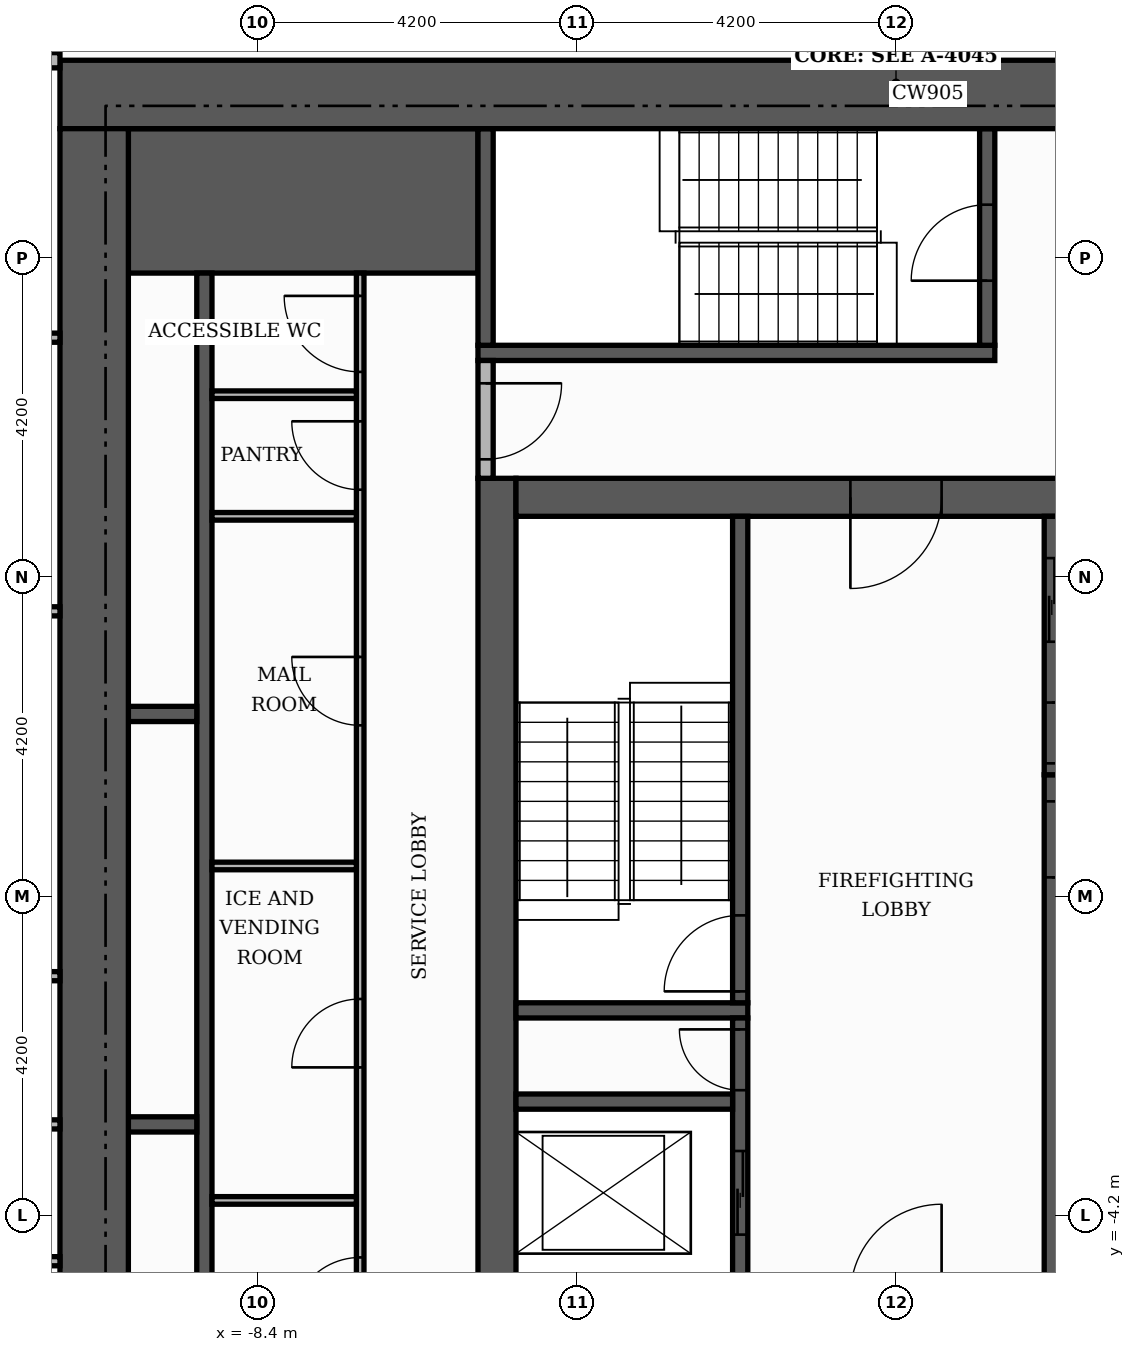
"""IFC4 building model, lengths in metres.
Left out: names, types, materials, properties, quantities, classifications, styles, units other than length and angle.
Written with IfcOpenShell. Run it as: python <this file> out.ifc"""

import sys

from ifc_helpers import new_model, si_unit, direction, frame, frame_2d, origin, place, context, subcontext, project, spatial, rectangle, extrude, element, fill, save


model = new_model("IFC4")
c1 = context("Model", 3, precision=1e-05, world=origin(), true_north=direction((0.0, 1.0)))
c2 = subcontext(c1, "Body", "Model", "MODEL_VIEW")
j1 = project(units=[si_unit("LENGTHUNIT", "METRE"), si_unit("PLANEANGLEUNIT", "RADIAN")], contexts=[c1])
p1 = place(None, origin())
s1 = spatial("IfcSite", under=j1, at=p1, CompositionType="ELEMENT")
p2 = place(p1, origin())
s2 = spatial("IfcBuilding", under=s1, at=p2, CompositionType="ELEMENT")
p3 = place(p2, frame((0.0, 0.0, 283.5)))
s3 = spatial("IfcBuildingStorey", under=s2, at=p3, CompositionType="ELEMENT", Elevation=283.5)
p4 = place(p3, frame((-5.25, -5.0, 0.0), z_axis=(0.0, 0.0, 1.0), x_axis=(0.0, 1.0, 0.0)))
e1 = element("IfcWall", 1, at=p4, inside=s3, PredefinedType="SHEAR", context=c2, shape_type="SweptSolid", body=[
    extrude(rectangle(XDim=10.5, YDim=0.5, at=frame_2d((5.25, 0.0))), origin(), (0.0, 0.0, 1.0), 3.4),
])
p5 = place(p3, frame((-5.0, 5.25, 0.0), z_axis=(0.0, 0.0, 1.0), x_axis=(1.0, 0.0, 0.0)))
e2 = element("IfcWall", 2, at=p5, inside=s3, PredefinedType="SHEAR", context=c2, shape_type="SweptSolid", body=[
    extrude(rectangle(XDim=10.0, YDim=0.5, at=frame_2d((5.0, 0.0))), origin(), (0.0, 0.0, 1.0), 3.4),
])
p6 = place(p5, frame((4.4, 0.0, 0.0)))
e3 = element("IfcOpeningElement", 3, at=p6, cuts=e2, PredefinedType="OPENING", context=c2, shape_type="SweptSolid", body=[
    extrude(rectangle(XDim=1.2, YDim=2.1, at=frame_2d((0.6, 1.05))), frame((0.0, 0.26, 0.0), z_axis=(0.0, -1.0, 0.0), x_axis=(1.0, 0.0, 0.0)), (0.0, 0.0, 1.0), 0.52),
])
p7 = place(p3, frame((-10.1, 9.15, 0.0), z_axis=(0.0, 0.0, 1.0), x_axis=(1.0, 0.0, 0.0)))
e4 = element("IfcWall", 4, at=p7, inside=s3, PredefinedType="SHEAR", context=c2, shape_type="SweptSolid", body=[
    extrude(rectangle(XDim=4.6, YDim=1.9, at=frame_2d((2.3, 0.0))), origin(), (0.0, 0.0, 1.0), 3.4),
])
p8 = place(p3, frame((2.05, -5.0, 0.0), z_axis=(0.0, 0.0, 1.0), x_axis=(0.0, 1.0, 0.0)))
e5 = element("IfcWall", 5, at=p8, inside=s3, PredefinedType="SHEAR", context=c2, shape_type="SweptSolid", body=[
    extrude(rectangle(XDim=6.6, YDim=0.2, at=frame_2d((3.3, 0.0))), origin(), (0.0, 0.0, 1.0), 3.4),
])
p9 = place(p8, frame((5.25, 0.0, 0.0)))
e6 = element("IfcOpeningElement", 6, at=p9, cuts=e5, PredefinedType="OPENING", context=c2, shape_type="SweptSolid", body=[
    extrude(rectangle(XDim=1.0, YDim=2.1, at=frame_2d((0.5, 1.05))), frame((0.0, 0.11, 0.0), z_axis=(0.0, -1.0, 0.0), x_axis=(1.0, 0.0, 0.0)), (0.0, 0.0, 1.0), 0.22),
])
p10 = place(p3, frame((-5.0, -1.5, 0.0), z_axis=(0.0, 0.0, 1.0), x_axis=(1.0, 0.0, 0.0)))
e7 = element("IfcWall", 7, at=p10, inside=s3, PredefinedType="SHEAR", context=c2, shape_type="SweptSolid", body=[
    extrude(rectangle(XDim=3.05, YDim=0.2, at=frame_2d((1.525, 0.0))), origin(), (0.0, 0.0, 1.0), 3.4),
])
p11 = place(p3, frame((-2.05, -1.4, 0.0), z_axis=(0.0, 0.0, 1.0), x_axis=(0.0, 1.0, 0.0)))
e8 = element("IfcWall", 8, at=p11, inside=s3, PredefinedType="SHEAR", context=c2, shape_type="SweptSolid", body=[
    extrude(rectangle(XDim=6.4, YDim=0.2, at=frame_2d((3.2, 0.0))), origin(), (0.0, 0.0, 1.0), 3.4),
])
p12 = place(p11, frame((0.15, 0.0, 0.0)))
e9 = element("IfcOpeningElement", 9, at=p12, cuts=e8, PredefinedType="OPENING", context=c2, shape_type="SweptSolid", body=[
    extrude(rectangle(XDim=1.0, YDim=2.1, at=frame_2d((0.5, 1.05))), frame((0.0, 0.11, 0.0), z_axis=(0.0, -1.0, 0.0), x_axis=(1.0, 0.0, 0.0)), (0.0, 0.0, 1.0), 0.22),
])
p13 = place(p3, frame((-5.5, 7.15, 0.0), z_axis=(0.0, 0.0, 1.0), x_axis=(1.0, 0.0, 0.0)))
e10 = element("IfcWall", 10, at=p13, inside=s3, PredefinedType="SHEAR", context=c2, shape_type="SweptSolid", body=[
    extrude(rectangle(XDim=6.8, YDim=0.2, at=frame_2d((3.4, 0.0))), origin(), (0.0, 0.0, 1.0), 3.4),
])
p14 = place(p3, frame((-5.4, 7.25, 0.0), z_axis=(0.0, 0.0, 1.0), x_axis=(0.0, 1.0, 0.0)))
e11 = element("IfcWall", 11, at=p14, inside=s3, PredefinedType="SHEAR", context=c2, shape_type="SweptSolid", body=[
    extrude(rectangle(XDim=2.85, YDim=0.2, at=frame_2d((1.425, 0.0))), origin(), (0.0, 0.0, 1.0), 3.4),
])
p15 = place(p3, frame((1.2, 7.25, 0.0), z_axis=(0.0, 0.0, 1.0), x_axis=(0.0, 1.0, 0.0)))
e12 = element("IfcWall", 12, at=p15, inside=s3, PredefinedType="SHEAR", context=c2, shape_type="SweptSolid", body=[
    extrude(rectangle(XDim=2.85, YDim=0.2, at=frame_2d((1.425, 0.0))), origin(), (0.0, 0.0, 1.0), 3.4),
])
p16 = place(p15, frame((0.85, 0.0, 0.0)))
e13 = element("IfcOpeningElement", 13, at=p16, cuts=e12, PredefinedType="OPENING", context=c2, shape_type="SweptSolid", body=[
    extrude(rectangle(XDim=1.0, YDim=2.1, at=frame_2d((0.5, 1.05))), frame((0.0, 0.11, 0.0), z_axis=(0.0, -1.0, 0.0), x_axis=(1.0, 0.0, 0.0)), (0.0, 0.0, 1.0), 0.22),
])
p17 = place(p3, frame((-9.1, -8.2, 0.0), z_axis=(0.0, 0.0, 1.0), x_axis=(0.0, 1.0, 0.0)))
e14 = element("IfcWall", 14, at=p17, inside=s3, PredefinedType="SHEAR", context=c2, shape_type="SweptSolid", body=[
    extrude(rectangle(XDim=16.4, YDim=0.2, at=frame_2d((8.2, 0.0))), origin(), (0.0, 0.0, 1.0), 3.4),
])
p18 = place(p3, frame((-2.05, -5.0, 0.0), z_axis=(0.0, 0.0, 1.0), x_axis=(0.0, 1.0, 0.0)))
e15 = element("IfcWall", 15, at=p18, inside=s3, PredefinedType="SHEAR", context=c2, shape_type="SweptSolid", body=[
    extrude(rectangle(XDim=3.4, YDim=0.2, at=frame_2d((1.7, 0.0))), origin(), (0.0, 0.0, 1.0), 3.4),
])
p19 = place(p18, frame((0.55, 0.0, 0.0)))
e16 = element("IfcOpeningElement", 16, at=p19, cuts=e15, PredefinedType="OPENING", context=c2, shape_type="SweptSolid", body=[
    extrude(rectangle(XDim=1.1, YDim=2.1, at=frame_2d((0.55, 1.05))), frame((0.0, 0.11, 0.0), z_axis=(0.0, -1.0, 0.0), x_axis=(1.0, 0.0, 0.0)), (0.0, 0.0, 1.0), 0.22),
])
p20 = place(p18, frame((2.45, 0.0, 0.0)))
e17 = element("IfcOpeningElement", 17, at=p20, cuts=e15, PredefinedType="OPENING", context=c2, shape_type="SweptSolid", body=[
    extrude(rectangle(XDim=0.8, YDim=2.1, at=frame_2d((0.4, 1.05))), frame((0.0, 0.11, 0.0), z_axis=(0.0, -1.0, 0.0), x_axis=(1.0, 0.0, 0.0)), (0.0, 0.0, 1.0), 0.22),
])
p21 = place(p3, frame((-10.1, -3.0, 0.0), z_axis=(0.0, 0.0, 1.0), x_axis=(1.0, 0.0, 0.0)))
e18 = element("IfcWall", 18, at=p21, inside=s3, PredefinedType="SHEAR", context=c2, shape_type="SweptSolid", body=[
    extrude(rectangle(XDim=0.9, YDim=0.2, at=frame_2d((0.45, 0.0))), origin(), (0.0, 0.0, 1.0), 3.4),
])
p22 = place(p3, frame((-5.0, -2.7, 0.0), z_axis=(0.0, 0.0, 1.0), x_axis=(1.0, 0.0, 0.0)))
e19 = element("IfcWall", 19, at=p22, inside=s3, PredefinedType="SHEAR", context=c2, shape_type="SweptSolid", body=[
    extrude(rectangle(XDim=2.85, YDim=0.2, at=frame_2d((1.425, 0.0))), origin(), (0.0, 0.0, 1.0), 3.4),
])
p23 = place(p3, frame((2.05, 1.6, 0.0), z_axis=(0.0, 0.0, 1.0), x_axis=(0.0, 1.0, 0.0)))
e20 = element("IfcWall", 20, at=p23, inside=s3, PredefinedType="SHEAR", context=c2, shape_type="SweptSolid", body=[
    extrude(rectangle(XDim=3.4, YDim=0.2, at=frame_2d((1.7, 0.0))), origin(), (0.0, 0.0, 1.0), 3.4),
])
p24 = place(p23, frame((1.75, 0.0, 0.0)))
e21 = element("IfcOpeningElement", 21, at=p24, cuts=e20, PredefinedType="OPENING", context=c2, shape_type="SweptSolid", body=[
    extrude(rectangle(XDim=1.1, YDim=2.1, at=frame_2d((0.55, 1.05))), frame((0.0, 0.11, 0.0), z_axis=(0.0, -1.0, 0.0), x_axis=(1.0, 0.0, 0.0)), (0.0, 0.0, 1.0), 0.22),
])
p25 = place(p23, frame((0.15, 0.0, 0.0)))
e22 = element("IfcOpeningElement", 22, at=p25, cuts=e20, PredefinedType="OPENING", context=c2, shape_type="SweptSolid", body=[
    extrude(rectangle(XDim=0.8, YDim=2.1, at=frame_2d((0.4, 1.05))), frame((0.0, 0.11, 0.0), z_axis=(0.0, -1.0, 0.0), x_axis=(1.0, 0.0, 0.0)), (0.0, 0.0, 1.0), 0.22),
])
p26 = place(p3, frame((-10.1, 2.4, 0.0), z_axis=(0.0, 0.0, 1.0), x_axis=(1.0, 0.0, 0.0)))
e23 = element("IfcWall", 23, at=p26, inside=s3, PredefinedType="SHEAR", context=c2, shape_type="SweptSolid", body=[
    extrude(rectangle(XDim=0.9, YDim=0.2, at=frame_2d((0.45, 0.0))), origin(), (0.0, 0.0, 1.0), 3.4),
])
p27 = place(p3, frame((-11.0, 10.55, 0.0), z_axis=(0.0, 0.0, 1.0), x_axis=(1.0, 0.0, 0.0)))
e24 = element("IfcWall", 24, at=p27, inside=s3, PredefinedType="SHEAR", context=c2, shape_type="SweptSolid", body=[
    extrude(rectangle(XDim=22.0, YDim=0.9, at=frame_2d((11.0, 0.0))), origin(), (0.0, 0.0, 1.0), 3.4),
])
p28 = place(p27, frame((13.3, 0.0, 0.0)))
e25 = element("IfcOpeningElement", 25, at=p28, cuts=e24, PredefinedType="OPENING", context=c2, shape_type="SweptSolid", body=[
    extrude(rectangle(XDim=1.8, YDim=2.2, at=frame_2d((0.9, 1.1))), frame((0.0, 0.46, 0.0), z_axis=(0.0, -1.0, 0.0), x_axis=(1.0, 0.0, 0.0)), (0.0, 0.0, 1.0), 0.92),
])
p29 = place(p3, frame((-10.55, -10.1, 0.0), z_axis=(0.0, 0.0, 1.0), x_axis=(0.0, 1.0, 0.0)))
e26 = element("IfcWall", 26, at=p29, inside=s3, PredefinedType="SHEAR", context=c2, shape_type="SweptSolid", body=[
    extrude(rectangle(XDim=20.2, YDim=0.9, at=frame_2d((10.1, 0.0))), origin(), (0.0, 0.0, 1.0), 3.4),
])
p30 = place(p3, frame((-7.05, -8.2, 0.0), z_axis=(0.0, 0.0, 1.0), x_axis=(0.0, 1.0, 0.0)))
e27 = element("IfcWall", 27, at=p30, inside=s3, PredefinedType="PARTITIONING", context=c2, shape_type="SweptSolid", body=[
    extrude(rectangle(XDim=16.4, YDim=0.1, at=frame_2d((8.2, 0.0))), origin(), (0.0, 0.0, 1.0), 3.4),
])
p31 = place(p30, frame((0.45, 0.0, 0.0)))
e28 = element("IfcOpeningElement", 28, at=p31, cuts=e27, PredefinedType="OPENING", context=c2, shape_type="SweptSolid", body=[
    extrude(rectangle(XDim=0.9, YDim=2.1, at=frame_2d((0.45, 1.05))), frame((0.0, 0.06, 0.0), z_axis=(0.0, -1.0, 0.0), x_axis=(1.0, 0.0, 0.0)), (0.0, 0.0, 1.0), 0.12),
])
p32 = place(p30, frame((2.55, 0.0, 0.0)))
e29 = element("IfcOpeningElement", 29, at=p32, cuts=e27, PredefinedType="OPENING", context=c2, shape_type="SweptSolid", body=[
    extrude(rectangle(XDim=0.9, YDim=2.1, at=frame_2d((0.45, 1.05))), frame((0.0, 0.06, 0.0), z_axis=(0.0, -1.0, 0.0), x_axis=(1.0, 0.0, 0.0)), (0.0, 0.0, 1.0), 0.12),
])
p33 = place(p30, frame((5.95, 0.0, 0.0)))
e30 = element("IfcOpeningElement", 30, at=p33, cuts=e27, PredefinedType="OPENING", context=c2, shape_type="SweptSolid", body=[
    extrude(rectangle(XDim=0.9, YDim=2.1, at=frame_2d((0.45, 1.05))), frame((0.0, 0.06, 0.0), z_axis=(0.0, -1.0, 0.0), x_axis=(1.0, 0.0, 0.0)), (0.0, 0.0, 1.0), 0.12),
])
p34 = place(p30, frame((10.45, 0.0, 0.0)))
e31 = element("IfcOpeningElement", 31, at=p34, cuts=e27, PredefinedType="OPENING", context=c2, shape_type="SweptSolid", body=[
    extrude(rectangle(XDim=0.9, YDim=2.1, at=frame_2d((0.45, 1.05))), frame((0.0, 0.06, 0.0), z_axis=(0.0, -1.0, 0.0), x_axis=(1.0, 0.0, 0.0)), (0.0, 0.0, 1.0), 0.12),
])
p35 = place(p30, frame((13.55, 0.0, 0.0)))
e32 = element("IfcOpeningElement", 32, at=p35, cuts=e27, PredefinedType="OPENING", context=c2, shape_type="SweptSolid", body=[
    extrude(rectangle(XDim=0.9, YDim=2.1, at=frame_2d((0.45, 1.05))), frame((0.0, 0.06, 0.0), z_axis=(0.0, -1.0, 0.0), x_axis=(1.0, 0.0, 0.0)), (0.0, 0.0, 1.0), 0.12),
])
p36 = place(p30, frame((15.1, 0.0, 0.0)))
e33 = element("IfcOpeningElement", 33, at=p36, cuts=e27, PredefinedType="OPENING", context=c2, shape_type="SweptSolid", body=[
    extrude(rectangle(XDim=1.0, YDim=2.1, at=frame_2d((0.5, 1.05))), frame((0.0, 0.06, 0.0), z_axis=(0.0, -1.0, 0.0), x_axis=(1.0, 0.0, 0.0)), (0.0, 0.0, 1.0), 0.12),
])
for number, where, z_axis, x_axis in (
    (34, (-9.0, -4.0, 0.0), (0.0, 0.0, 1.0), (1.0, 0.0, 0.0)),
    (35, (-9.0, 0.4, 0.0), (0.0, 0.0, 1.0), (1.0, 0.0, 0.0)),
    (36, (-9.0, 5.0, 0.0), (0.0, 0.0, 1.0), (1.0, 0.0, 0.0)),
):
    element("IfcWall", number, at=place(p3, frame(where, z_axis=z_axis, x_axis=x_axis)), inside=s3, PredefinedType="PARTITIONING", context=c2, shape_type="SweptSolid", body=[
        extrude(rectangle(XDim=1.9, YDim=0.1, at=frame_2d((0.95, 0.0))), origin(), (0.0, 0.0, 1.0), 3.4),
    ])
p37 = place(p3, frame((-5.4, 5.5, 0.0), z_axis=(0.0, 0.0, 1.0), x_axis=(0.0, 1.0, 0.0)))
e37 = element("IfcWall", 37, at=p37, inside=s3, PredefinedType="PARTITIONING", context=c2, shape_type="SweptSolid", body=[
    extrude(rectangle(XDim=1.55, YDim=0.2, at=frame_2d((0.775, 0.0))), origin(), (0.0, 0.0, 1.0), 3.4),
])
p38 = place(p37, frame((0.25, 0.0, 0.0)))
e38 = element("IfcOpeningElement", 38, at=p38, cuts=e37, PredefinedType="OPENING", context=c2, shape_type="SweptSolid", body=[
    extrude(rectangle(XDim=1.0, YDim=2.1, at=frame_2d((0.5, 1.05))), frame((0.0, 0.11, 0.0), z_axis=(0.0, -1.0, 0.0), x_axis=(1.0, 0.0, 0.0)), (0.0, 0.0, 1.0), 0.22),
])
p39 = place(p3, frame((-9.0, 6.6, 0.0), z_axis=(0.0, 0.0, 1.0), x_axis=(1.0, 0.0, 0.0)))
e39 = element("IfcWall", 39, at=p39, inside=s3, PredefinedType="PARTITIONING", context=c2, shape_type="SweptSolid", body=[
    extrude(rectangle(XDim=1.9, YDim=0.1, at=frame_2d((0.95, 0.0))), origin(), (0.0, 0.0, 1.0), 3.4),
])
for number, where, z_axis, x_axis in (
    (40, (-18.32, -4.8, 0.0), (0.0, 0.0, 1.0), (1.0, 0.0, 0.0)),
    (41, (-18.32, -3.0, 0.0), (0.0, 0.0, 1.0), (1.0, 0.0, 0.0)),
    (42, (-18.32, -1.05, 0.0), (0.0, 0.0, 1.0), (1.0, 0.0, 0.0)),
    (43, (-18.32, 3.75, 0.0), (0.0, 0.0, 1.0), (1.0, 0.0, 0.0)),
):
    element("IfcWall", number, at=place(p3, frame(where, z_axis=z_axis, x_axis=x_axis)), inside=s3, PredefinedType="PARTITIONING", context=c2, shape_type="SweptSolid", body=[
        extrude(rectangle(XDim=7.32, YDim=0.12, at=frame_2d((3.66, 0.0))), origin(), (0.0, 0.0, 1.0), 3.4),
    ])
p40 = place(p3, frame((-18.32, 7.35, 0.0), z_axis=(0.0, 0.0, 1.0), x_axis=(1.0, 0.0, 0.0)))
e44 = element("IfcWall", 44, at=p40, inside=s3, PredefinedType="PARTITIONING", context=c2, shape_type="SweptSolid", body=[
    extrude(rectangle(XDim=7.32, YDim=0.12, at=frame_2d((3.66, 0.0))), origin(), (0.0, 0.0, 1.0), 3.4),
])
p41 = place(p40, frame((3.21, 0.0, 0.0)))
e45 = element("IfcOpeningElement", 45, at=p41, cuts=e44, PredefinedType="OPENING", context=c2, shape_type="SweptSolid", body=[
    extrude(rectangle(XDim=0.9, YDim=2.1, at=frame_2d((0.45, 1.05))), frame((0.0, 0.07, 0.0), z_axis=(0.0, -1.0, 0.0), x_axis=(1.0, 0.0, 0.0)), (0.0, 0.0, 1.0), 0.14),
])
p42 = place(p3, frame((-13.65, 11.0, 0.0), z_axis=(0.0, 0.0, 1.0), x_axis=(1.0, 0.0, 0.0)))
e46 = element("IfcWall", 46, at=p42, inside=s3, PredefinedType="PARTITIONING", context=c2, shape_type="SweptSolid", body=[
    extrude(rectangle(XDim=2.65, YDim=0.2, at=frame_2d((1.325, 0.0))), origin(), (0.0, 0.0, 1.0), 3.4),
])
p43 = place(p42, frame((0.775, 0.0, 0.0)))
e47 = element("IfcOpeningElement", 47, at=p43, cuts=e46, PredefinedType="OPENING", context=c2, shape_type="SweptSolid", body=[
    extrude(rectangle(XDim=1.1, YDim=2.4, at=frame_2d((0.55, 1.2))), frame((0.0, 0.11, 0.0), z_axis=(0.0, -1.0, 0.0), x_axis=(1.0, 0.0, 0.0)), (0.0, 0.0, 1.0), 0.22),
])
p44 = place(p24, origin())
e48 = element("IfcDoor", 48, at=p44, inside=s3, OperationType="SLIDING_TO_LEFT", PredefinedType="DOOR", context=c2, shape_type="SweptSolid", body=[
    extrude(rectangle(XDim=1.1, YDim=2.1, at=frame_2d((0.55, 1.05))), frame((0.0, 0.025, 0.0), z_axis=(0.0, -1.0, 0.0), x_axis=(1.0, 0.0, 0.0)), (0.0, 0.0, 1.0), 0.05),
])
fill(e21, e48)
p45 = place(p19, origin())
e49 = element("IfcDoor", 49, at=p45, inside=s3, OperationType="SLIDING_TO_LEFT", PredefinedType="DOOR", context=c2, shape_type="SweptSolid", body=[
    extrude(rectangle(XDim=1.1, YDim=2.1, at=frame_2d((0.55, 1.05))), frame((0.0, 0.025, 0.0), z_axis=(0.0, -1.0, 0.0), x_axis=(1.0, 0.0, 0.0)), (0.0, 0.0, 1.0), 0.05),
])
fill(e16, e49)
p46 = place(p12, origin())
e50 = element("IfcDoor", 50, at=p46, inside=s3, OperationType="SINGLE_SWING_LEFT", PredefinedType="DOOR", context=c2, shape_type="SweptSolid", body=[
    extrude(rectangle(XDim=1.0, YDim=2.1, at=frame_2d((0.5, 1.05))), frame((0.0, 0.025, 0.0), z_axis=(0.0, -1.0, 0.0), x_axis=(1.0, 0.0, 0.0)), (0.0, 0.0, 1.0), 0.05),
])
fill(e9, e50)
p47 = place(p9, frame((1.0, 0.0, 0.0), z_axis=(0.0, 0.0, 1.0), x_axis=(-1.0, 0.0, 0.0)))
e51 = element("IfcDoor", 51, at=p47, inside=s3, OperationType="SINGLE_SWING_LEFT", PredefinedType="DOOR", context=c2, shape_type="SweptSolid", body=[
    extrude(rectangle(XDim=1.0, YDim=2.1, at=frame_2d((0.5, 1.05))), frame((0.0, 0.025, 0.0), z_axis=(0.0, -1.0, 0.0), x_axis=(1.0, 0.0, 0.0)), (0.0, 0.0, 1.0), 0.05),
])
fill(e6, e51)
p48 = place(p25, frame((0.8, 0.0, 0.0), z_axis=(0.0, 0.0, 1.0), x_axis=(-1.0, 0.0, 0.0)))
e52 = element("IfcDoor", 52, at=p48, inside=s3, OperationType="SINGLE_SWING_RIGHT", PredefinedType="DOOR", context=c2, shape_type="SweptSolid", body=[
    extrude(rectangle(XDim=0.8, YDim=2.1, at=frame_2d((0.4, 1.05))), frame((0.0, 0.025, 0.0), z_axis=(0.0, -1.0, 0.0), x_axis=(1.0, 0.0, 0.0)), (0.0, 0.0, 1.0), 0.05),
])
fill(e22, e52)
p49 = place(p20, origin())
e53 = element("IfcDoor", 53, at=p49, inside=s3, OperationType="SINGLE_SWING_RIGHT", PredefinedType="DOOR", context=c2, shape_type="SweptSolid", body=[
    extrude(rectangle(XDim=0.8, YDim=2.1, at=frame_2d((0.4, 1.05))), frame((0.0, 0.025, 0.0), z_axis=(0.0, -1.0, 0.0), x_axis=(1.0, 0.0, 0.0)), (0.0, 0.0, 1.0), 0.05),
])
fill(e17, e53)
p50 = place(p6, frame((1.2, 0.0, 0.0), z_axis=(0.0, 0.0, 1.0), x_axis=(-1.0, 0.0, 0.0)))
e54 = element("IfcDoor", 54, at=p50, inside=s3, OperationType="SINGLE_SWING_LEFT", PredefinedType="DOOR", context=c2, shape_type="SweptSolid", body=[
    extrude(rectangle(XDim=1.2, YDim=2.1, at=frame_2d((0.6, 1.05))), frame((0.0, 0.025, 0.0), z_axis=(0.0, -1.0, 0.0), x_axis=(1.0, 0.0, 0.0)), (0.0, 0.0, 1.0), 0.05),
])
fill(e3, e54)
p51 = place(p16, origin())
e55 = element("IfcDoor", 55, at=p51, inside=s3, OperationType="SINGLE_SWING_LEFT", PredefinedType="DOOR", context=c2, shape_type="SweptSolid", body=[
    extrude(rectangle(XDim=1.0, YDim=2.1, at=frame_2d((0.5, 1.05))), frame((0.0, 0.025, 0.0), z_axis=(0.0, -1.0, 0.0), x_axis=(1.0, 0.0, 0.0)), (0.0, 0.0, 1.0), 0.05),
])
fill(e13, e55)
p52 = place(p38, frame((1.0, 0.0, 0.0), z_axis=(0.0, 0.0, 1.0), x_axis=(-1.0, 0.0, 0.0)))
e56 = element("IfcDoor", 56, at=p52, inside=s3, OperationType="SINGLE_SWING_RIGHT", PredefinedType="DOOR", context=c2, shape_type="SweptSolid", body=[
    extrude(rectangle(XDim=1.0, YDim=2.1, at=frame_2d((0.5, 1.05))), frame((0.0, 0.025, 0.0), z_axis=(0.0, -1.0, 0.0), x_axis=(1.0, 0.0, 0.0)), (0.0, 0.0, 1.0), 0.05),
])
fill(e38, e56)
p53 = place(p32, origin())
e57 = element("IfcDoor", 57, at=p53, inside=s3, OperationType="SINGLE_SWING_LEFT", PredefinedType="DOOR", context=c2, shape_type="SweptSolid", body=[
    extrude(rectangle(XDim=0.9, YDim=2.1, at=frame_2d((0.45, 1.05))), frame((0.0, 0.025, 0.0), z_axis=(0.0, -1.0, 0.0), x_axis=(1.0, 0.0, 0.0)), (0.0, 0.0, 1.0), 0.05),
])
fill(e29, e57)
p54 = place(p33, origin())
e58 = element("IfcDoor", 58, at=p54, inside=s3, OperationType="SINGLE_SWING_LEFT", PredefinedType="DOOR", context=c2, shape_type="SweptSolid", body=[
    extrude(rectangle(XDim=0.9, YDim=2.1, at=frame_2d((0.45, 1.05))), frame((0.0, 0.025, 0.0), z_axis=(0.0, -1.0, 0.0), x_axis=(1.0, 0.0, 0.0)), (0.0, 0.0, 1.0), 0.05),
])
fill(e30, e58)
p55 = place(p34, origin())
e59 = element("IfcDoor", 59, at=p55, inside=s3, OperationType="SINGLE_SWING_RIGHT", PredefinedType="DOOR", context=c2, shape_type="SweptSolid", body=[
    extrude(rectangle(XDim=0.9, YDim=2.1, at=frame_2d((0.45, 1.05))), frame((0.0, 0.025, 0.0), z_axis=(0.0, -1.0, 0.0), x_axis=(1.0, 0.0, 0.0)), (0.0, 0.0, 1.0), 0.05),
])
fill(e31, e59)
p56 = place(p35, origin())
e60 = element("IfcDoor", 60, at=p56, inside=s3, OperationType="SINGLE_SWING_RIGHT", PredefinedType="DOOR", context=c2, shape_type="SweptSolid", body=[
    extrude(rectangle(XDim=0.9, YDim=2.1, at=frame_2d((0.45, 1.05))), frame((0.0, 0.025, 0.0), z_axis=(0.0, -1.0, 0.0), x_axis=(1.0, 0.0, 0.0)), (0.0, 0.0, 1.0), 0.05),
])
fill(e32, e60)
p57 = place(p36, origin())
e61 = element("IfcDoor", 61, at=p57, inside=s3, OperationType="SINGLE_SWING_RIGHT", PredefinedType="DOOR", context=c2, shape_type="SweptSolid", body=[
    extrude(rectangle(XDim=1.0, YDim=2.1, at=frame_2d((0.5, 1.05))), frame((0.0, 0.025, 0.0), z_axis=(0.0, -1.0, 0.0), x_axis=(1.0, 0.0, 0.0)), (0.0, 0.0, 1.0), 0.05),
])
fill(e33, e61)
save(model, sys.argv[1])
